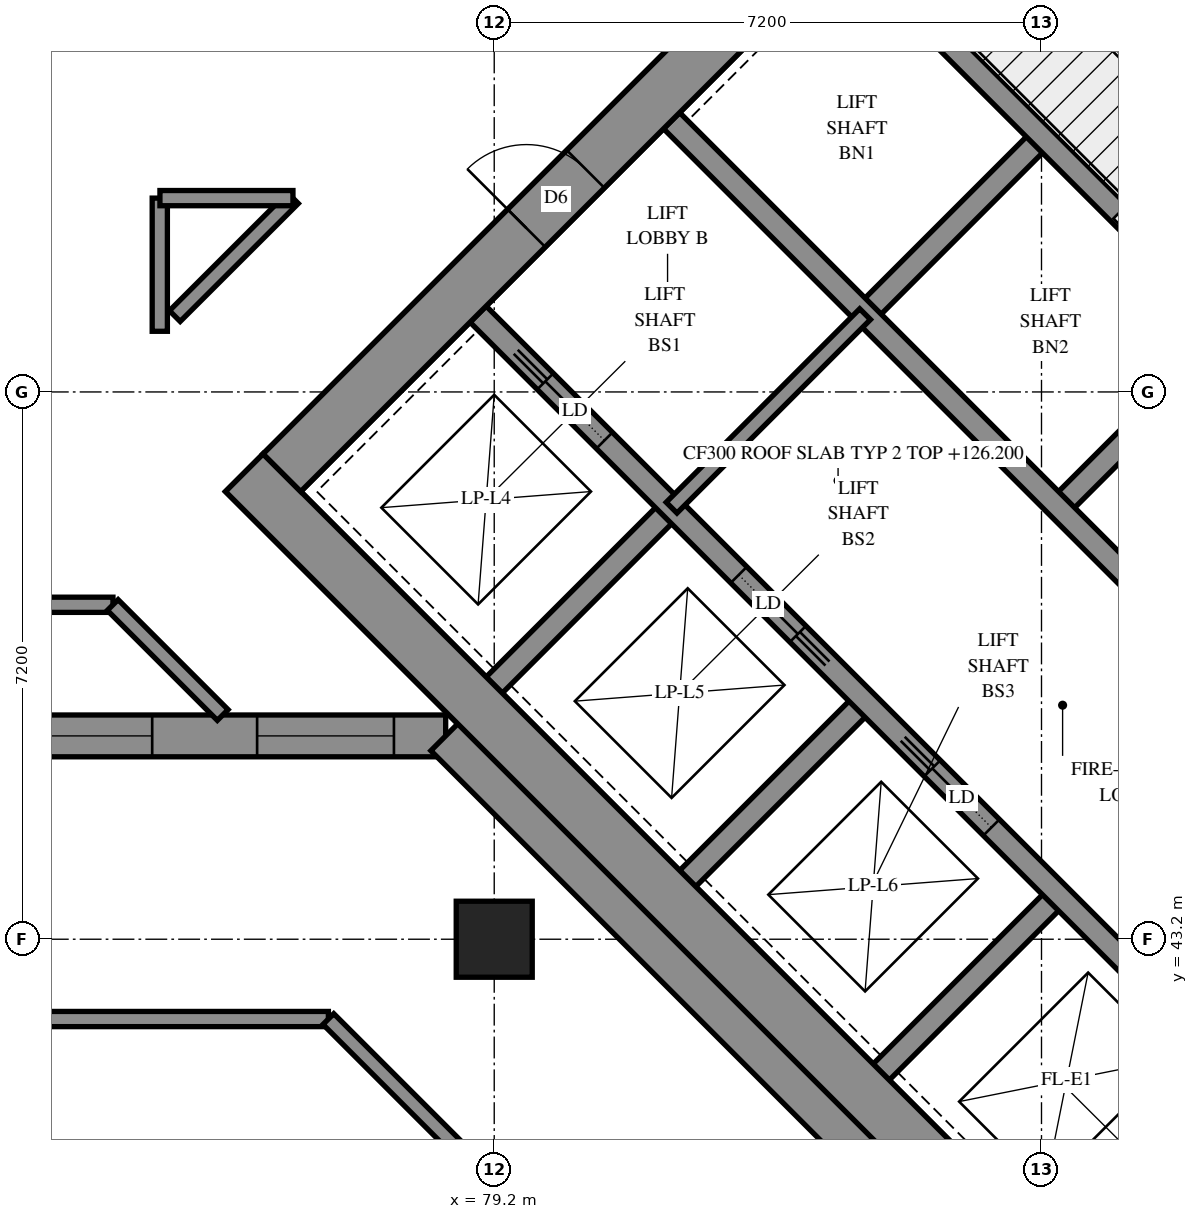
"""IFC4 building model, lengths in metres.
Left out: names, types, materials, properties, quantities, classifications, styles, units other than length and angle.
Written with IfcOpenShell. Run it as: python <this file> out.ifc"""

import sys

from ifc_helpers import new_model, si_unit, direction, frame, frame_2d, origin, origin_2d, place, context, subcontext, project, spatial, polyline, rectangle, outline, extrude, element, fill, save


model = new_model("IFC4")
c1 = context("Model", 3, precision=1e-05, world=origin(), true_north=direction((0.0, 1.0)))
c2 = subcontext(c1, "Body", "Model", "MODEL_VIEW")
j1 = project(units=[si_unit("LENGTHUNIT", "METRE"), si_unit("PLANEANGLEUNIT", "RADIAN")], contexts=[c1])
p1 = place(None, origin())
s1 = spatial("IfcSite", under=j1, at=p1, CompositionType="ELEMENT")
p2 = place(p1, origin())
s2 = spatial("IfcBuilding", under=s1, at=p2, CompositionType="ELEMENT")
p3 = place(p2, frame((0.0, 0.0, 126.2)))
s3 = spatial("IfcBuildingStorey", under=s2, at=p3, CompositionType="ELEMENT", Elevation=126.2)
p4 = place(p3, frame((79.2, 43.2, -0.3), z_axis=(0.0, 0.0, 1.0), x_axis=(1.0, 0.0, 0.0)))
e1 = element("IfcColumn", 1, at=p4, inside=s3, PredefinedType="COLUMN", context=c2, shape_type="SweptSolid", body=[
    extrude(rectangle(XDim=1.0, YDim=1.0, at=origin_2d()), origin(), (0.0, 0.0, 1.0), 5.0),
])
p5 = place(p3, frame((75.912, 49.337, -0.3), z_axis=(0.0, 0.0, 1.0), x_axis=(0.7071036166, -0.7071099457, 0.0)))
e2 = element("IfcWall", 2, at=p5, inside=s3, PredefinedType="SHEAR", context=c2, shape_type="SweptSolid", body=[
    extrude(rectangle(XDim=15.8, YDim=0.7, at=frame_2d((7.9, 0.0))), origin(), (0.0, 0.0, 1.0), 4.3),
])
p6 = place(p3, frame((86.589, 60.014, -0.3), z_axis=(0.0, 0.0, 1.0), x_axis=(0.7071099457, -0.7071036166, 0.0)))
e3 = element("IfcWall", 3, at=p6, inside=s3, PredefinedType="SHEAR", context=c2, shape_type="SweptSolid", body=[
    extrude(rectangle(XDim=15.8, YDim=0.7, at=frame_2d((7.9, 0.0))), origin(), (0.0, 0.0, 1.0), 4.3),
])
p7 = place(p6, frame((10.7, 0.0, 0.3)))
e4 = element("IfcOpeningElement", 4, at=p7, cuts=e3, PredefinedType="OPENING", context=c2, shape_type="SweptSolid", body=[
    extrude(rectangle(XDim=0.8, YDim=2.1, at=frame_2d((0.4, 1.05))), frame((0.0, 0.36, 0.0), z_axis=(0.0, -1.0, 0.0), x_axis=(1.0, 0.0, 0.0)), (0.0, 0.0, 1.0), 0.72),
])
p8 = place(p3, frame((76.407, 49.337, -0.3), z_axis=(0.0, 0.0, 1.0), x_axis=(0.7071067812, 0.7071067812, 0.0)))
e5 = element("IfcWall", 5, at=p8, inside=s3, PredefinedType="SHEAR", context=c2, shape_type="SweptSolid", body=[
    extrude(rectangle(XDim=14.4, YDim=0.7, at=frame_2d((7.2, 0.0))), origin(), (0.0, 0.0, 1.0), 4.3),
])
p9 = place(p8, frame((4.55, 0.0, 0.3)))
e6 = element("IfcOpeningElement", 6, at=p9, cuts=e5, PredefinedType="OPENING", context=c2, shape_type="SweptSolid", body=[
    extrude(rectangle(XDim=1.1, YDim=2.1, at=frame_2d((0.55, 1.05))), frame((0.0, 0.36, 0.0), z_axis=(0.0, -1.0, 0.0), x_axis=(1.0, 0.0, 0.0)), (0.0, 0.0, 1.0), 0.72),
])
p10 = place(p8, frame((11.35, 0.0, 0.3)))
e7 = element("IfcOpeningElement", 7, at=p10, cuts=e5, PredefinedType="OPENING", context=c2, shape_type="SweptSolid", body=[
    extrude(rectangle(XDim=1.1, YDim=2.1, at=frame_2d((0.55, 1.05))), frame((0.0, 0.36, 0.0), z_axis=(0.0, -1.0, 0.0), x_axis=(1.0, 0.0, 0.0)), (0.0, 0.0, 1.0), 0.72),
])
p11 = place(p3, frame((87.084, 38.66, -0.3), z_axis=(0.0, 0.0, 1.0), x_axis=(0.7071067812, 0.7071067812, 0.0)))
e8 = element("IfcWall", 8, at=p11, inside=s3, PredefinedType="SHEAR", context=c2, shape_type="SweptSolid", body=[
    extrude(rectangle(XDim=14.4, YDim=0.7, at=frame_2d((7.2, 0.0))), origin(), (0.0, 0.0, 1.0), 4.3),
])
p12 = place(p11, frame((4.55, 0.0, 0.3)))
e9 = element("IfcOpeningElement", 9, at=p12, cuts=e8, PredefinedType="OPENING", context=c2, shape_type="SweptSolid", body=[
    extrude(rectangle(XDim=1.1, YDim=2.1, at=frame_2d((0.55, 1.05))), frame((0.0, 0.36, 0.0), z_axis=(0.0, -1.0, 0.0), x_axis=(1.0, 0.0, 0.0)), (0.0, 0.0, 1.0), 0.72),
])
p13 = place(p11, frame((11.35, 0.0, 0.3)))
e10 = element("IfcOpeningElement", 10, at=p13, cuts=e8, PredefinedType="OPENING", context=c2, shape_type="SweptSolid", body=[
    extrude(rectangle(XDim=1.1, YDim=2.1, at=frame_2d((0.55, 1.05))), frame((0.0, 0.36, 0.0), z_axis=(0.0, -1.0, 0.0), x_axis=(1.0, 0.0, 0.0)), (0.0, 0.0, 1.0), 0.72),
])
for number, where, z_axis, x_axis in (
    (11, (79.2, 46.544, 0.0), (0.0, 0.0, 1.0), (0.707, 0.707, 0.0)),
    (12, (84.079, 51.423, 0.0), (0.0, 0.0, 1.0), (0.707, 0.707, 0.0)),
):
    element("IfcWall", number, at=place(p3, frame(where, z_axis=z_axis, x_axis=x_axis)), inside=s3, PredefinedType="SOLIDWALL", context=c2, shape_type="SweptSolid", body=[
        extrude(rectangle(XDim=3.3, YDim=0.3, at=frame_2d((1.65, 0.0))), origin(), (0.0, 0.0, 1.0), 4.7),
    ])
p14 = place(p3, frame((81.746, 43.999, 0.0), z_axis=(0.0, 0.0, 1.0), x_axis=(0.7071067812, 0.7071067812, 0.0)))
e13 = element("IfcWall", 13, at=p14, inside=s3, PredefinedType="SOLIDWALL", context=c2, shape_type="SweptSolid", body=[
    extrude(rectangle(XDim=3.3, YDim=0.3, at=frame_2d((1.65, 0.0))), origin(), (0.0, 0.0, 1.0), 4.7),
])
p15 = place(p3, frame((86.625, 48.878, 0.0), z_axis=(0.0, 0.0, 1.0), x_axis=(0.7071067812, 0.7071067812, 0.0)))
e14 = element("IfcWall", 14, at=p15, inside=s3, PredefinedType="SOLIDWALL", context=c2, shape_type="SweptSolid", body=[
    extrude(rectangle(XDim=3.3, YDim=0.3, at=frame_2d((1.65, 0.0))), origin(), (0.0, 0.0, 1.0), 4.7),
])
p16 = place(p3, frame((84.291, 41.453, 0.0), z_axis=(0.0, 0.0, 1.0), x_axis=(0.7071067812, 0.7071067812, 0.0)))
e15 = element("IfcWall", 15, at=p16, inside=s3, PredefinedType="SOLIDWALL", context=c2, shape_type="SweptSolid", body=[
    extrude(rectangle(XDim=3.3, YDim=0.3, at=frame_2d((1.65, 0.0))), origin(), (0.0, 0.0, 1.0), 4.7),
])
p17 = place(p3, frame((78.988, 51.423, 0.0), z_axis=(0.0, 0.0, 1.0), x_axis=(0.7071067812, -0.7071067812, 0.0)))
e16 = element("IfcWall", 16, at=p17, inside=s3, PredefinedType="SOLIDWALL", context=c2, shape_type="SweptSolid", body=[
    extrude(rectangle(XDim=14.4, YDim=0.3, at=frame_2d((7.2, 0.0))), origin(), (0.0, 0.0, 1.0), 4.7),
])
p18 = place(p17, frame((1.25, 0.0, 0.0)))
e17 = element("IfcOpeningElement", 17, at=p18, cuts=e16, PredefinedType="OPENING", context=c2, shape_type="SweptSolid", body=[
    extrude(rectangle(XDim=1.1, YDim=2.1, at=frame_2d((0.55, 1.05))), frame((0.0, 0.16, 0.0), z_axis=(0.0, -1.0, 0.0), x_axis=(1.0, 0.0, 0.0)), (0.0, 0.0, 1.0), 0.32),
])
p19 = place(p17, frame((4.85, 0.0, 0.0)))
e18 = element("IfcOpeningElement", 18, at=p19, cuts=e16, PredefinedType="OPENING", context=c2, shape_type="SweptSolid", body=[
    extrude(rectangle(XDim=1.1, YDim=2.1, at=frame_2d((0.55, 1.05))), frame((0.0, 0.16, 0.0), z_axis=(0.0, -1.0, 0.0), x_axis=(1.0, 0.0, 0.0)), (0.0, 0.0, 1.0), 0.32),
])
p20 = place(p17, frame((8.45, 0.0, 0.0)))
e19 = element("IfcOpeningElement", 19, at=p20, cuts=e16, PredefinedType="OPENING", context=c2, shape_type="SweptSolid", body=[
    extrude(rectangle(XDim=1.1, YDim=2.1, at=frame_2d((0.55, 1.05))), frame((0.0, 0.16, 0.0), z_axis=(0.0, -1.0, 0.0), x_axis=(1.0, 0.0, 0.0)), (0.0, 0.0, 1.0), 0.32),
])
p21 = place(p17, frame((12.05, 0.0, 0.0)))
e20 = element("IfcOpeningElement", 20, at=p21, cuts=e16, PredefinedType="OPENING", context=c2, shape_type="SweptSolid", body=[
    extrude(rectangle(XDim=1.1, YDim=2.1, at=frame_2d((0.55, 1.05))), frame((0.0, 0.16, 0.0), z_axis=(0.0, -1.0, 0.0), x_axis=(1.0, 0.0, 0.0)), (0.0, 0.0, 1.0), 0.32),
])
p22 = place(p3, frame((81.534, 53.969, 0.0), z_axis=(0.0, 0.0, 1.0), x_axis=(0.707103309, -0.7071102534, 0.0)))
e21 = element("IfcWall", 21, at=p22, inside=s3, PredefinedType="SOLIDWALL", context=c2, shape_type="SweptSolid", body=[
    extrude(rectangle(XDim=14.4, YDim=0.3, at=frame_2d((7.2, 0.0))), origin(), (0.0, 0.0, 1.0), 4.7),
])
p23 = place(p22, frame((12.05, 0.0, 0.0)))
e22 = element("IfcOpeningElement", 22, at=p23, cuts=e21, PredefinedType="OPENING", context=c2, shape_type="SweptSolid", body=[
    extrude(rectangle(XDim=1.1, YDim=2.1, at=frame_2d((0.55, 1.05))), frame((0.0, 0.16, 0.0), z_axis=(0.0, -1.0, 0.0), x_axis=(1.0, 0.0, 0.0)), (0.0, 0.0, 1.0), 0.32),
])
p24 = place(p3, frame((83.867, 56.302, 0.0), z_axis=(0.0, 0.0, 1.0), x_axis=(0.7071137256, -0.7070998367, 0.0)))
e23 = element("IfcWall", 23, at=p24, inside=s3, PredefinedType="SOLIDWALL", context=c2, shape_type="SweptSolid", body=[
    extrude(rectangle(XDim=7.2, YDim=0.3, at=frame_2d((3.6, 0.0))), origin(), (0.0, 0.0, 1.0), 4.7),
])
p25 = place(p3, frame((104.267, 43.15, 0.0), z_axis=(0.0, 0.0, 1.0), x_axis=(-0.7071054305, 0.7071081319, 0.0)))
e24 = element("IfcWall", 24, at=p25, inside=s3, PredefinedType="SOLIDWALL", context=c2, shape_type="SweptSolid", body=[
    extrude(outline(polyline([(-0.275, -0.275), (37.131, -0.275), (36.903, 0.275), (0.275, 0.275), (-0.275, -0.275)])), origin(), (0.0, 0.0, 1.0), 4.7),
])
p26 = place(p25, frame((3.325, 0.0, 0.9)))
e25 = element("IfcOpeningElement", 25, at=p26, cuts=e24, PredefinedType="OPENING", context=c2, shape_type="SweptSolid", body=[
    extrude(rectangle(XDim=1.8, YDim=2.4, at=frame_2d((0.9, 1.2))), frame((0.0, 0.285, 0.0), z_axis=(0.0, -1.0, 0.0), x_axis=(1.0, 0.0, 0.0)), (0.0, 0.0, 1.0), 0.57),
])
p27 = place(p25, frame((6.675, 0.0, 0.9)))
e26 = element("IfcOpeningElement", 26, at=p27, cuts=e24, PredefinedType="OPENING", context=c2, shape_type="SweptSolid", body=[
    extrude(rectangle(XDim=1.8, YDim=2.4, at=frame_2d((0.9, 1.2))), frame((0.0, 0.285, 0.0), z_axis=(0.0, -1.0, 0.0), x_axis=(1.0, 0.0, 0.0)), (0.0, 0.0, 1.0), 0.57),
])
p28 = place(p25, frame((24.625, 0.0, 0.9)))
e27 = element("IfcOpeningElement", 27, at=p28, cuts=e24, PredefinedType="OPENING", context=c2, shape_type="SweptSolid", body=[
    extrude(rectangle(XDim=1.8, YDim=2.4, at=frame_2d((0.9, 1.2))), frame((0.0, 0.285, 0.0), z_axis=(0.0, -1.0, 0.0), x_axis=(1.0, 0.0, 0.0)), (0.0, 0.0, 1.0), 0.57),
])
p29 = place(p25, frame((28.225, 0.0, 0.9)))
e28 = element("IfcOpeningElement", 28, at=p29, cuts=e24, PredefinedType="OPENING", context=c2, shape_type="SweptSolid", body=[
    extrude(rectangle(XDim=1.8, YDim=2.4, at=frame_2d((0.9, 1.2))), frame((0.0, 0.285, 0.0), z_axis=(0.0, -1.0, 0.0), x_axis=(1.0, 0.0, 0.0)), (0.0, 0.0, 1.0), 0.57),
])
p30 = place(p25, frame((31.825, 0.0, 0.9)))
e29 = element("IfcOpeningElement", 29, at=p30, cuts=e24, PredefinedType="OPENING", context=c2, shape_type="SweptSolid", body=[
    extrude(rectangle(XDim=1.8, YDim=2.4, at=frame_2d((0.9, 1.2))), frame((0.0, 0.285, 0.0), z_axis=(0.0, -1.0, 0.0), x_axis=(1.0, 0.0, 0.0)), (0.0, 0.0, 1.0), 0.57),
])
p31 = place(p25, frame((34.714, 0.0, 0.9)))
e30 = element("IfcOpeningElement", 30, at=p31, cuts=e24, PredefinedType="OPENING", context=c2, shape_type="SweptSolid", body=[
    extrude(rectangle(XDim=1.8, YDim=2.4, at=frame_2d((0.9, 1.2))), frame((0.0, 0.285, 0.0), z_axis=(0.0, -1.0, 0.0), x_axis=(1.0, 0.0, 0.0)), (0.0, 0.0, 1.0), 0.57),
])
p32 = place(p3, frame((53.075, 45.875, 0.0), z_axis=(0.0, 0.0, 1.0), x_axis=(1.0, 0.0, 0.0)))
e31 = element("IfcWall", 31, at=p32, inside=s3, PredefinedType="SOLIDWALL", context=c2, shape_type="SweptSolid", body=[
    extrude(outline(polyline([(-0.275, -0.275), (25.372, -0.275), (25.6, 0.275), (0.275, 0.275), (-0.275, -0.275)])), origin(), (0.0, 0.0, 1.0), 4.7),
])
p33 = place(p32, frame((1.825, 0.0, 0.9)))
e32 = element("IfcOpeningElement", 32, at=p33, cuts=e31, PredefinedType="OPENING", context=c2, shape_type="SweptSolid", body=[
    extrude(rectangle(XDim=1.8, YDim=2.4, at=frame_2d((0.9, 1.2))), frame((0.0, 0.285, 0.0), z_axis=(0.0, -1.0, 0.0), x_axis=(1.0, 0.0, 0.0)), (0.0, 0.0, 1.0), 0.57),
])
p34 = place(p32, frame((5.425, 0.0, 0.9)))
e33 = element("IfcOpeningElement", 33, at=p34, cuts=e31, PredefinedType="OPENING", context=c2, shape_type="SweptSolid", body=[
    extrude(rectangle(XDim=1.8, YDim=2.4, at=frame_2d((0.9, 1.2))), frame((0.0, 0.285, 0.0), z_axis=(0.0, -1.0, 0.0), x_axis=(1.0, 0.0, 0.0)), (0.0, 0.0, 1.0), 0.57),
])
p35 = place(p32, frame((9.025, 0.0, 0.9)))
e34 = element("IfcOpeningElement", 34, at=p35, cuts=e31, PredefinedType="OPENING", context=c2, shape_type="SweptSolid", body=[
    extrude(rectangle(XDim=1.8, YDim=2.4, at=frame_2d((0.9, 1.2))), frame((0.0, 0.285, 0.0), z_axis=(0.0, -1.0, 0.0), x_axis=(1.0, 0.0, 0.0)), (0.0, 0.0, 1.0), 0.57),
])
p36 = place(p32, frame((12.625, 0.0, 0.9)))
e35 = element("IfcOpeningElement", 35, at=p36, cuts=e31, PredefinedType="OPENING", context=c2, shape_type="SweptSolid", body=[
    extrude(rectangle(XDim=1.8, YDim=2.4, at=frame_2d((0.9, 1.2))), frame((0.0, 0.285, 0.0), z_axis=(0.0, -1.0, 0.0), x_axis=(1.0, 0.0, 0.0)), (0.0, 0.0, 1.0), 0.57),
])
p37 = place(p32, frame((16.225, 0.0, 0.9)))
e36 = element("IfcOpeningElement", 36, at=p37, cuts=e31, PredefinedType="OPENING", context=c2, shape_type="SweptSolid", body=[
    extrude(rectangle(XDim=1.8, YDim=2.4, at=frame_2d((0.9, 1.2))), frame((0.0, 0.285, 0.0), z_axis=(0.0, -1.0, 0.0), x_axis=(1.0, 0.0, 0.0)), (0.0, 0.0, 1.0), 0.57),
])
p38 = place(p32, frame((19.825, 0.0, 0.9)))
e37 = element("IfcOpeningElement", 37, at=p38, cuts=e31, PredefinedType="OPENING", context=c2, shape_type="SweptSolid", body=[
    extrude(rectangle(XDim=1.8, YDim=2.4, at=frame_2d((0.9, 1.2))), frame((0.0, 0.285, 0.0), z_axis=(0.0, -1.0, 0.0), x_axis=(1.0, 0.0, 0.0)), (0.0, 0.0, 1.0), 0.57),
])
p39 = place(p32, frame((23.006, 0.0, 0.9)))
e38 = element("IfcOpeningElement", 38, at=p39, cuts=e31, PredefinedType="OPENING", context=c2, shape_type="SweptSolid", body=[
    extrude(rectangle(XDim=1.8, YDim=2.4, at=frame_2d((0.9, 1.2))), frame((0.0, 0.285, 0.0), z_axis=(0.0, -1.0, 0.0), x_axis=(1.0, 0.0, 0.0)), (0.0, 0.0, 1.0), 0.57),
])
p40 = place(p3, frame((78.561, 45.875, 0.0), z_axis=(0.0, 0.0, 1.0), x_axis=(0.7071067812, -0.7071067812, 0.0)))
e39 = element("IfcWall", 39, at=p40, inside=s3, PredefinedType="SOLIDWALL", context=c2, shape_type="SweptSolid", body=[
    extrude(outline(polyline([(0.114, -0.275), (22.779, -0.275), (22.229, 0.275), (-0.114, 0.275), (0.114, -0.275)])), origin(), (0.0, 0.0, 1.0), 4.7),
])
p41 = place(p40, frame((11.679, 0.0, 0.9)))
e40 = element("IfcOpeningElement", 40, at=p41, cuts=e39, PredefinedType="OPENING", context=c2, shape_type="SweptSolid", body=[
    extrude(rectangle(XDim=1.8, YDim=2.4, at=frame_2d((0.9, 1.2))), frame((0.0, 0.285, 0.0), z_axis=(0.0, -1.0, 0.0), x_axis=(1.0, 0.0, 0.0)), (0.0, 0.0, 1.0), 0.57),
])
p42 = place(p40, frame((15.279, 0.0, 0.9)))
e41 = element("IfcOpeningElement", 41, at=p42, cuts=e39, PredefinedType="OPENING", context=c2, shape_type="SweptSolid", body=[
    extrude(rectangle(XDim=1.8, YDim=2.4, at=frame_2d((0.9, 1.2))), frame((0.0, 0.285, 0.0), z_axis=(0.0, -1.0, 0.0), x_axis=(1.0, 0.0, 0.0)), (0.0, 0.0, 1.0), 0.57),
])
p43 = place(p40, frame((18.879, 0.0, 0.9)))
e42 = element("IfcOpeningElement", 42, at=p43, cuts=e39, PredefinedType="OPENING", context=c2, shape_type="SweptSolid", body=[
    extrude(rectangle(XDim=1.8, YDim=2.4, at=frame_2d((0.9, 1.2))), frame((0.0, 0.285, 0.0), z_axis=(0.0, -1.0, 0.0), x_axis=(1.0, 0.0, 0.0)), (0.0, 0.0, 1.0), 0.57),
])
p44 = place(p3, frame((107.838, 44.847, 0.0), z_axis=(0.0, 0.0, 1.0), x_axis=(-0.7071067812, 0.7071067812, 0.0)))
e43 = element("IfcWall", 43, at=p44, inside=s3, PredefinedType="SOLIDWALL", context=c2, shape_type="SweptSolid", body=[
    extrude(outline(polyline([(-0.1, -0.1), (39.926, -0.1), (39.843, 0.1), (0.1, 0.1), (-0.1, -0.1)])), origin(), (0.0, 0.0, 1.0), 4.7),
])
p45 = place(p3, frame((49.35, 42.15, 0.0), z_axis=(0.0, 0.0, 1.0), x_axis=(1.0, 0.0, 0.0)))
e44 = element("IfcWall", 44, at=p45, inside=s3, PredefinedType="SOLIDWALL", context=c2, shape_type="SweptSolid", body=[
    extrude(outline(polyline([(-0.1, -0.1), (27.627, -0.1), (27.709, 0.1), (0.1, 0.1), (-0.1, -0.1)])), origin(), (0.0, 0.0, 1.0), 4.7),
])
p46 = place(p3, frame((77.018, 42.15, 0.0), z_axis=(0.0, 0.0, 1.0), x_axis=(0.7071067812, -0.7071067812, 0.0)))
e45 = element("IfcWall", 45, at=p46, inside=s3, PredefinedType="SOLIDWALL", context=c2, shape_type="SweptSolid", body=[
    extrude(outline(polyline([(0.041, -0.1), (24.786, -0.1), (24.586, 0.1), (-0.041, 0.1), (0.041, -0.1)])), origin(), (0.0, 0.0, 1.0), 4.7),
])
p47 = place(p3, frame((81.534, 48.878, 0.0), z_axis=(0.0, 0.0, 1.0), x_axis=(0.707092892, 0.7071206701, 0.0)))
e46 = element("IfcWall", 46, at=p47, inside=s3, PredefinedType="PARTITIONING", context=c2, shape_type="SweptSolid", body=[
    extrude(rectangle(XDim=3.6, YDim=0.2, at=frame_2d((1.8, 0.0))), origin(), (0.0, 0.0, 1.0), 4.7),
])
p48 = place(p3, frame((54.8, 47.6, 0.0), z_axis=(0.0, 0.0, 1.0), x_axis=(1.0, 0.0, 0.0)))
e47 = element("IfcWall", 47, at=p48, inside=s3, PredefinedType="PARTITIONING", context=c2, shape_type="SweptSolid", body=[
    extrude(rectangle(XDim=19.384, YDim=0.2, at=frame_2d((9.692, 0.0))), origin(), (0.0, 0.0, 1.0), 4.7),
])
p49 = place(p48, frame((12.156, 0.0, 0.0)))
e48 = element("IfcOpeningElement", 48, at=p49, cuts=e47, PredefinedType="OPENING", context=c2, shape_type="SweptSolid", body=[
    extrude(rectangle(XDim=1.0, YDim=2.1, at=frame_2d((0.5, 1.05))), frame((0.0, 0.11, 0.0), z_axis=(0.0, -1.0, 0.0), x_axis=(1.0, 0.0, 0.0)), (0.0, 0.0, 1.0), 0.22),
])
p50 = place(p3, frame((74.998, 51.398, 0.0), z_axis=(0.0, 0.0, 1.0), x_axis=(0.7075619512, 0.706651318, 0.0)))
e49 = element("IfcWall", 49, at=p50, inside=s3, PredefinedType="PARTITIONING", context=c2, shape_type="SweptSolid", body=[
    extrude(rectangle(XDim=2.196, YDim=0.2, at=frame_2d((1.098, 0.0))), origin(), (0.0, 0.0, 1.0), 4.7),
])
p51 = place(p3, frame((74.181, 47.597, 0.0), z_axis=(0.0, 0.0, 1.0), x_axis=(0.7070823464, -0.7071312152, 0.0)))
e50 = element("IfcWall", 50, at=p51, inside=s3, PredefinedType="PARTITIONING", context=c2, shape_type="SweptSolid", body=[
    extrude(rectangle(XDim=2.046, YDim=0.2, at=frame_2d((1.023, 0.0))), origin(), (0.0, 0.0, 1.0), 4.7),
])
p52 = place(p3, frame((74.8, 51.198, 0.0), z_axis=(0.0, 0.0, 1.0), x_axis=(0.0, 1.0, 0.0)))
e51 = element("IfcWall", 51, at=p52, inside=s3, PredefinedType="PARTITIONING", context=c2, shape_type="SweptSolid", body=[
    extrude(rectangle(XDim=1.752, YDim=0.2, at=frame_2d((0.876, 0.0))), origin(), (0.0, 0.0, 1.0), 4.7),
])
p53 = place(p3, frame((74.802, 52.95, 0.0), z_axis=(0.0, 0.0, 1.0), x_axis=(1.0, 0.0, 0.0)))
e52 = element("IfcWall", 52, at=p53, inside=s3, PredefinedType="PARTITIONING", context=c2, shape_type="SweptSolid", body=[
    extrude(rectangle(XDim=1.75, YDim=0.2, at=frame_2d((0.875, 0.0))), origin(), (0.0, 0.0, 1.0), 4.7),
])
p54 = place(p38, origin())
e53 = element("IfcWindow", 53, at=p54, inside=s3, PartitioningType="SINGLE_PANEL", PredefinedType="WINDOW", context=c2, shape_type="SweptSolid", body=[
    extrude(rectangle(XDim=1.8, YDim=2.4, at=frame_2d((0.9, 1.2))), frame((0.0, 0.155, 0.0), z_axis=(0.0, -1.0, 0.0), x_axis=(1.0, 0.0, 0.0)), (0.0, 0.0, 1.0), 0.06),
])
fill(e37, e53)
p55 = place(p39, origin())
e54 = element("IfcWindow", 54, at=p55, inside=s3, PartitioningType="SINGLE_PANEL", PredefinedType="WINDOW", context=c2, shape_type="SweptSolid", body=[
    extrude(rectangle(XDim=1.8, YDim=2.4, at=frame_2d((0.9, 1.2))), frame((0.0, 0.155, 0.0), z_axis=(0.0, -1.0, 0.0), x_axis=(1.0, 0.0, 0.0)), (0.0, 0.0, 1.0), 0.06),
])
fill(e38, e54)
p56 = place(p9, origin())
e55 = element("IfcDoor", 55, at=p56, inside=s3, OperationType="DOUBLE_DOOR_SINGLE_SWING", PredefinedType="DOOR", context=c2, shape_type="SweptSolid", body=[
    extrude(rectangle(XDim=1.1, YDim=2.1, at=frame_2d((0.55, 1.05))), frame((0.0, 0.025, 0.0), z_axis=(0.0, -1.0, 0.0), x_axis=(1.0, 0.0, 0.0)), (0.0, 0.0, 1.0), 0.05),
])
fill(e6, e55)
p57 = place(p18, origin())
e56 = element("IfcDoor", 56, at=p57, inside=s3, OperationType="SLIDING_TO_LEFT", PredefinedType="DOOR", context=c2, shape_type="SweptSolid", body=[
    extrude(rectangle(XDim=1.1, YDim=2.1, at=frame_2d((0.55, 1.05))), frame((0.0, 0.025, 0.0), z_axis=(0.0, -1.0, 0.0), x_axis=(1.0, 0.0, 0.0)), (0.0, 0.0, 1.0), 0.05),
])
fill(e17, e56)
p58 = place(p19, origin())
e57 = element("IfcDoor", 57, at=p58, inside=s3, OperationType="SLIDING_TO_RIGHT", PredefinedType="DOOR", context=c2, shape_type="SweptSolid", body=[
    extrude(rectangle(XDim=1.1, YDim=2.1, at=frame_2d((0.55, 1.05))), frame((0.0, 0.025, 0.0), z_axis=(0.0, -1.0, 0.0), x_axis=(1.0, 0.0, 0.0)), (0.0, 0.0, 1.0), 0.05),
])
fill(e18, e57)
p59 = place(p20, origin())
e58 = element("IfcDoor", 58, at=p59, inside=s3, OperationType="SLIDING_TO_LEFT", PredefinedType="DOOR", context=c2, shape_type="SweptSolid", body=[
    extrude(rectangle(XDim=1.1, YDim=2.1, at=frame_2d((0.55, 1.05))), frame((0.0, 0.025, 0.0), z_axis=(0.0, -1.0, 0.0), x_axis=(1.0, 0.0, 0.0)), (0.0, 0.0, 1.0), 0.05),
])
fill(e19, e58)
save(model, sys.argv[1])
